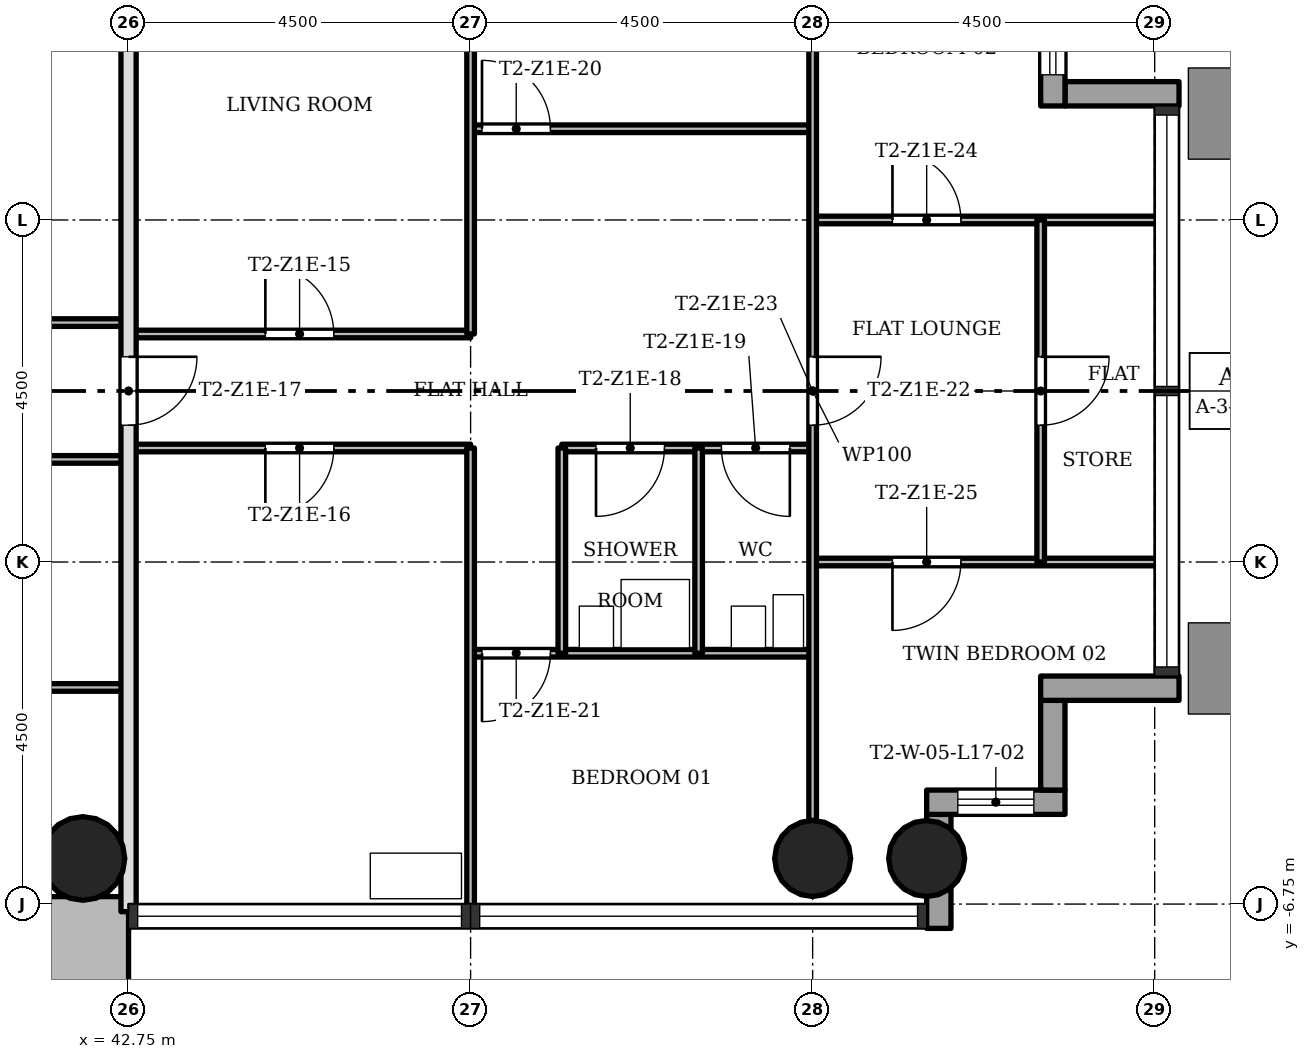
"""IFC4 building model, lengths in metres.
Left out: names, types, materials, properties, quantities, classifications, styles, units other than length and angle.
Written with IfcOpenShell. Run it as: python <this file> out.ifc"""

import sys

from ifc_helpers import new_model, si_unit, direction, frame, frame_2d, origin, origin_2d, place, context, subcontext, project, spatial, rectangle, hollow_circle, extrude, element, fill, save


model = new_model("IFC4")
c1 = context("Model", 3, precision=1e-05, world=origin(), true_north=direction((0.0, 1.0)))
c2 = subcontext(c1, "Body", "Model", "MODEL_VIEW")
j1 = project(units=[si_unit("LENGTHUNIT", "METRE"), si_unit("PLANEANGLEUNIT", "RADIAN")], contexts=[c1])
p1 = place(None, origin())
s1 = spatial("IfcSite", under=j1, at=p1, CompositionType="ELEMENT")
p2 = place(p1, origin())
s2 = spatial("IfcBuilding", under=s1, at=p2, CompositionType="ELEMENT")
p3 = place(p2, frame((0.0, 0.0, 65.3)))
s3 = spatial("IfcBuildingStorey", under=s2, at=p3, CompositionType="ELEMENT", Elevation=65.3)
p4 = place(p3, frame((42.2, -15.248, 0.0), z_axis=(0.0, 0.0, 1.0), x_axis=(0.0, 1.0, 0.0)))
e1 = element("IfcWall", 1, at=p4, inside=s3, PredefinedType="SHEAR", context=c2, shape_type="SweptSolid", body=[
    extrude(rectangle(XDim=8.596, YDim=1.1, at=frame_2d((4.298, 0.0))), origin(), (0.0, 0.0, 1.0), 3.4),
])
for number, where, z_axis, x_axis in (
    (2, (51.75, -6.15, 0.0), (0.0, 0.0, 1.0), (1.0, 0.0, 0.0)),
    (3, (53.25, -6.15, 0.0), (0.0, 0.0, 1.0), (1.0, 0.0, 0.0)),
):
    element("IfcColumn", number, at=place(p3, frame(where, z_axis=z_axis, x_axis=x_axis)), inside=s3, PredefinedType="COLUMN", context=c2, shape_type="SweptSolid", body=[
        extrude(hollow_circle(Radius=0.5, WallThickness=0.036, at=origin_2d()), origin(), (0.0, 0.0, 1.0), 3.4),
    ])
p5 = place(p3, frame((42.15, -6.15, 0.0), z_axis=(0.0, 0.0, 1.0), x_axis=(1.0, 0.0, 0.0)))
e4 = element("IfcColumn", 4, at=p5, inside=s3, PredefinedType="COLUMN", context=c2, shape_type="SweptSolid", body=[
    extrude(hollow_circle(Radius=0.55, WallThickness=0.04, at=origin_2d()), origin(), (0.0, 0.0, 1.0), 3.4),
])
p6 = place(p3, frame((53.41, -7.07, -0.3), z_axis=(0.0, 0.0, 1.0), x_axis=(0.0, 1.0, 0.0)))
e5 = element("IfcWall", 5, at=p6, inside=s3, PredefinedType="STANDARD", context=c2, shape_type="SweptSolid", body=[
    extrude(rectangle(XDim=1.5, YDim=0.32, at=frame_2d((0.75, 0.0))), origin(), (0.0, 0.0, 1.0), 3.4),
])
p7 = place(p3, frame((53.25, -5.41, -0.3), z_axis=(0.0, 0.0, 1.0), x_axis=(1.0, 0.0, 0.0)))
e6 = element("IfcWall", 6, at=p7, inside=s3, PredefinedType="STANDARD", context=c2, shape_type="SweptSolid", body=[
    extrude(rectangle(XDim=1.82, YDim=0.32, at=frame_2d((0.91, 0.0))), origin(), (0.0, 0.0, 1.0), 3.4),
])
p8 = place(p7, frame((0.41, 0.0, 1.2)))
e7 = element("IfcOpeningElement", 7, at=p8, cuts=e6, PredefinedType="OPENING", context=c2, shape_type="SweptSolid", body=[
    extrude(rectangle(XDim=1.0, YDim=1.5, at=frame_2d((0.5, 0.75))), frame((0.0, 0.17, 0.0), z_axis=(0.0, -1.0, 0.0), x_axis=(1.0, 0.0, 0.0)), (0.0, 0.0, 1.0), 0.34),
])
p9 = place(p3, frame((54.91, -5.25, -0.3), z_axis=(0.0, 0.0, 1.0), x_axis=(0.0, 1.0, 0.0)))
e8 = element("IfcWall", 8, at=p9, inside=s3, PredefinedType="STANDARD", context=c2, shape_type="SweptSolid", body=[
    extrude(rectangle(XDim=1.18, YDim=0.32, at=frame_2d((0.59, 0.0))), origin(), (0.0, 0.0, 1.0), 3.4),
])
p10 = place(p3, frame((54.75, -3.91, -0.3), z_axis=(0.0, 0.0, 1.0), x_axis=(1.0, 0.0, 0.0)))
e9 = element("IfcWall", 9, at=p10, inside=s3, PredefinedType="STANDARD", context=c2, shape_type="SweptSolid", body=[
    extrude(rectangle(XDim=1.82, YDim=0.32, at=frame_2d((0.91, 0.0))), origin(), (0.0, 0.0, 1.0), 3.4),
])
p11 = place(p3, frame((56.57, 3.91, -0.3), z_axis=(0.0, 0.0, 1.0), x_axis=(-1.0, 0.0, 0.0)))
e10 = element("IfcWall", 10, at=p11, inside=s3, PredefinedType="STANDARD", context=c2, shape_type="SweptSolid", body=[
    extrude(rectangle(XDim=1.5, YDim=0.32, at=frame_2d((0.75, 0.0))), origin(), (0.0, 0.0, 1.0), 3.4),
])
p12 = place(p3, frame((54.91, 3.75, -0.3), z_axis=(0.0, 0.0, 1.0), x_axis=(0.0, 1.0, 0.0)))
e11 = element("IfcWall", 11, at=p12, inside=s3, PredefinedType="STANDARD", context=c2, shape_type="SweptSolid", body=[
    extrude(rectangle(XDim=1.82, YDim=0.32, at=frame_2d((0.91, 0.0))), origin(), (0.0, 0.0, 1.0), 3.4),
])
p13 = place(p12, frame((0.41, 0.0, 1.2)))
e12 = element("IfcOpeningElement", 12, at=p13, cuts=e11, PredefinedType="OPENING", context=c2, shape_type="SweptSolid", body=[
    extrude(rectangle(XDim=1.0, YDim=1.5, at=frame_2d((0.5, 0.75))), frame((0.0, 0.17, 0.0), z_axis=(0.0, -1.0, 0.0), x_axis=(1.0, 0.0, 0.0)), (0.0, 0.0, 1.0), 0.34),
])
p14 = place(p3, frame((42.75, -3.9, 0.0), z_axis=(0.0, 0.0, 1.0), x_axis=(-1.0, 0.0, 0.0)))
e13 = element("IfcWall", 13, at=p14, inside=s3, PredefinedType="PARTITIONING", context=c2, shape_type="SweptSolid", body=[
    extrude(rectangle(XDim=5.25, YDim=0.1, at=frame_2d((2.625, 0.0))), origin(), (0.0, 0.0, 1.0), 3.0),
])
p15 = place(p3, frame((51.75, -3.45, 0.0), z_axis=(0.0, 0.0, 1.0), x_axis=(-1.0, 0.0, 0.0)))
e14 = element("IfcWall", 14, at=p15, inside=s3, PredefinedType="PARTITIONING", context=c2, shape_type="SweptSolid", body=[
    extrude(rectangle(XDim=4.5, YDim=0.1, at=frame_2d((2.25, 0.0))), origin(), (0.0, 0.0, 1.0), 3.0),
])
p16 = place(p15, frame((3.45, 0.0, 0.0)))
e15 = element("IfcOpeningElement", 15, at=p16, cuts=e14, PredefinedType="OPENING", context=c2, shape_type="SweptSolid", body=[
    extrude(rectangle(XDim=0.9, YDim=2.1, at=frame_2d((0.45, 1.05))), frame((0.0, 0.06, 0.0), z_axis=(0.0, -1.0, 0.0), x_axis=(1.0, 0.0, 0.0)), (0.0, 0.0, 1.0), 0.12),
])
p17 = place(p3, frame((56.35, -2.25, 0.0), z_axis=(0.0, 0.0, 1.0), x_axis=(-1.0, 0.0, 0.0)))
e16 = element("IfcWall", 16, at=p17, inside=s3, PredefinedType="PARTITIONING", context=c2, shape_type="SweptSolid", body=[
    extrude(rectangle(XDim=4.6, YDim=0.1, at=frame_2d((2.3, 0.0))), origin(), (0.0, 0.0, 1.0), 3.0),
])
p18 = place(p17, frame((2.65, 0.0, 0.0)))
e17 = element("IfcOpeningElement", 17, at=p18, cuts=e16, PredefinedType="OPENING", context=c2, shape_type="SweptSolid", body=[
    extrude(rectangle(XDim=0.9, YDim=2.1, at=frame_2d((0.45, 1.05))), frame((0.0, 0.06, 0.0), z_axis=(0.0, -1.0, 0.0), x_axis=(1.0, 0.0, 0.0)), (0.0, 0.0, 1.0), 0.12),
])
p19 = place(p3, frame((42.75, -0.9, 0.0), z_axis=(0.0, 0.0, 1.0), x_axis=(-1.0, 0.0, 0.0)))
e18 = element("IfcWall", 18, at=p19, inside=s3, PredefinedType="PARTITIONING", context=c2, shape_type="SweptSolid", body=[
    extrude(rectangle(XDim=5.25, YDim=0.1, at=frame_2d((2.625, 0.0))), origin(), (0.0, 0.0, 1.0), 3.0),
])
p20 = place(p19, frame((2.175, 0.0, 0.0)))
e19 = element("IfcOpeningElement", 19, at=p20, cuts=e18, PredefinedType="OPENING", context=c2, shape_type="SweptSolid", body=[
    extrude(rectangle(XDim=0.9, YDim=2.1, at=frame_2d((0.45, 1.05))), frame((0.0, 0.06, 0.0), z_axis=(0.0, -1.0, 0.0), x_axis=(1.0, 0.0, 0.0)), (0.0, 0.0, 1.0), 0.12),
])
p21 = place(p3, frame((51.75, -0.75, 0.0), z_axis=(0.0, 0.0, 1.0), x_axis=(-1.0, 0.0, 0.0)))
e20 = element("IfcWall", 20, at=p21, inside=s3, PredefinedType="PARTITIONING", context=c2, shape_type="SweptSolid", body=[
    extrude(rectangle(XDim=3.3, YDim=0.1, at=frame_2d((1.65, 0.0))), origin(), (0.0, 0.0, 1.0), 3.0),
])
p22 = place(p21, frame((1.95, 0.0, 0.0)))
e21 = element("IfcOpeningElement", 21, at=p22, cuts=e20, PredefinedType="OPENING", context=c2, shape_type="SweptSolid", body=[
    extrude(rectangle(XDim=0.9, YDim=2.1, at=frame_2d((0.45, 1.05))), frame((0.0, 0.06, 0.0), z_axis=(0.0, -1.0, 0.0), x_axis=(1.0, 0.0, 0.0)), (0.0, 0.0, 1.0), 0.12),
])
p23 = place(p21, frame((0.3, 0.0, 0.0)))
e22 = element("IfcOpeningElement", 22, at=p23, cuts=e20, PredefinedType="OPENING", context=c2, shape_type="SweptSolid", body=[
    extrude(rectangle(XDim=0.9, YDim=2.1, at=frame_2d((0.45, 1.05))), frame((0.0, 0.06, 0.0), z_axis=(0.0, -1.0, 0.0), x_axis=(1.0, 0.0, 0.0)), (0.0, 0.0, 1.0), 0.12),
])
p24 = place(p3, frame((47.25, -0.75, 0.0), z_axis=(0.0, 0.0, 1.0), x_axis=(-1.0, 0.0, 0.0)))
e23 = element("IfcWall", 23, at=p24, inside=s3, PredefinedType="PARTITIONING", context=c2, shape_type="SweptSolid", body=[
    extrude(rectangle(XDim=4.5, YDim=0.1, at=frame_2d((2.25, 0.0))), origin(), (0.0, 0.0, 1.0), 3.0),
])
p25 = place(p24, frame((1.8, 0.0, 0.0)))
e24 = element("IfcOpeningElement", 24, at=p25, cuts=e23, PredefinedType="OPENING", context=c2, shape_type="SweptSolid", body=[
    extrude(rectangle(XDim=0.9, YDim=2.1, at=frame_2d((0.45, 1.05))), frame((0.0, 0.06, 0.0), z_axis=(0.0, -1.0, 0.0), x_axis=(1.0, 0.0, 0.0)), (0.0, 0.0, 1.0), 0.12),
])
p26 = place(p3, frame((47.25, 0.75, 0.0), z_axis=(0.0, 0.0, 1.0), x_axis=(-1.0, 0.0, 0.0)))
e25 = element("IfcWall", 25, at=p26, inside=s3, PredefinedType="PARTITIONING", context=c2, shape_type="SweptSolid", body=[
    extrude(rectangle(XDim=4.5, YDim=0.1, at=frame_2d((2.25, 0.0))), origin(), (0.0, 0.0, 1.0), 3.0),
])
p27 = place(p26, frame((1.8, 0.0, 0.0)))
e26 = element("IfcOpeningElement", 26, at=p27, cuts=e25, PredefinedType="OPENING", context=c2, shape_type="SweptSolid", body=[
    extrude(rectangle(XDim=0.9, YDim=2.1, at=frame_2d((0.45, 1.05))), frame((0.0, 0.06, 0.0), z_axis=(0.0, -1.0, 0.0), x_axis=(1.0, 0.0, 0.0)), (0.0, 0.0, 1.0), 0.12),
])
p28 = place(p3, frame((42.75, 0.9, 0.0), z_axis=(0.0, 0.0, 1.0), x_axis=(-1.0, 0.0, 0.0)))
e27 = element("IfcWall", 27, at=p28, inside=s3, PredefinedType="PARTITIONING", context=c2, shape_type="SweptSolid", body=[
    extrude(rectangle(XDim=5.25, YDim=0.1, at=frame_2d((2.625, 0.0))), origin(), (0.0, 0.0, 1.0), 3.0),
])
p29 = place(p3, frame((56.35, 2.25, 0.0), z_axis=(0.0, 0.0, 1.0), x_axis=(-1.0, 0.0, 0.0)))
e28 = element("IfcWall", 28, at=p29, inside=s3, PredefinedType="PARTITIONING", context=c2, shape_type="SweptSolid", body=[
    extrude(rectangle(XDim=4.6, YDim=0.1, at=frame_2d((2.3, 0.0))), origin(), (0.0, 0.0, 1.0), 3.0),
])
p30 = place(p29, frame((2.65, 0.0, 0.0)))
e29 = element("IfcOpeningElement", 29, at=p30, cuts=e28, PredefinedType="OPENING", context=c2, shape_type="SweptSolid", body=[
    extrude(rectangle(XDim=0.9, YDim=2.1, at=frame_2d((0.45, 1.05))), frame((0.0, 0.06, 0.0), z_axis=(0.0, -1.0, 0.0), x_axis=(1.0, 0.0, 0.0)), (0.0, 0.0, 1.0), 0.12),
])
p31 = place(p3, frame((51.75, 3.45, 0.0), z_axis=(0.0, 0.0, 1.0), x_axis=(-1.0, 0.0, 0.0)))
e30 = element("IfcWall", 30, at=p31, inside=s3, PredefinedType="PARTITIONING", context=c2, shape_type="SweptSolid", body=[
    extrude(rectangle(XDim=4.5, YDim=0.1, at=frame_2d((2.25, 0.0))), origin(), (0.0, 0.0, 1.0), 3.0),
])
p32 = place(p31, frame((3.45, 0.0, 0.0)))
e31 = element("IfcOpeningElement", 31, at=p32, cuts=e30, PredefinedType="OPENING", context=c2, shape_type="SweptSolid", body=[
    extrude(rectangle(XDim=0.9, YDim=2.1, at=frame_2d((0.45, 1.05))), frame((0.0, 0.06, 0.0), z_axis=(0.0, -1.0, 0.0), x_axis=(1.0, 0.0, 0.0)), (0.0, 0.0, 1.0), 0.12),
])
p33 = place(p3, frame((54.75, -2.25, 0.0), z_axis=(0.0, 0.0, 1.0), x_axis=(0.0, 1.0, 0.0)))
e32 = element("IfcWall", 32, at=p33, inside=s3, PredefinedType="PARTITIONING", context=c2, shape_type="SweptSolid", body=[
    extrude(rectangle(XDim=4.5, YDim=0.1, at=frame_2d((2.25, 0.0))), origin(), (0.0, 0.0, 1.0), 3.0),
])
p34 = place(p33, frame((1.8, 0.0, 0.0)))
e33 = element("IfcOpeningElement", 33, at=p34, cuts=e32, PredefinedType="OPENING", context=c2, shape_type="SweptSolid", body=[
    extrude(rectangle(XDim=0.9, YDim=2.1, at=frame_2d((0.45, 1.05))), frame((0.0, 0.06, 0.0), z_axis=(0.0, -1.0, 0.0), x_axis=(1.0, 0.0, 0.0)), (0.0, 0.0, 1.0), 0.12),
])
p35 = place(p3, frame((51.75, -5.65, 0.0), z_axis=(0.0, 0.0, 1.0), x_axis=(0.0, 1.0, 0.0)))
e34 = element("IfcWall", 34, at=p35, inside=s3, PredefinedType="PARTITIONING", context=c2, shape_type="SweptSolid", body=[
    extrude(rectangle(XDim=11.3, YDim=0.1, at=frame_2d((5.65, 0.0))), origin(), (0.0, 0.0, 1.0), 3.0),
])
p36 = place(p35, frame((5.2, 0.0, 0.0)))
e35 = element("IfcOpeningElement", 35, at=p36, cuts=e34, PredefinedType="OPENING", context=c2, shape_type="SweptSolid", body=[
    extrude(rectangle(XDim=0.9, YDim=2.1, at=frame_2d((0.45, 1.05))), frame((0.0, 0.06, 0.0), z_axis=(0.0, -1.0, 0.0), x_axis=(1.0, 0.0, 0.0)), (0.0, 0.0, 1.0), 0.12),
])
for number, where, z_axis, x_axis in (
    (36, (50.25, -3.45, 0.0), (0.0, 0.0, 1.0), (0.0, 1.0, 0.0)),
    (37, (48.45, -3.45, 0.0), (0.0, 0.0, 1.0), (0.0, 1.0, 0.0)),
):
    element("IfcWall", number, at=place(p3, frame(where, z_axis=z_axis, x_axis=x_axis)), inside=s3, PredefinedType="PARTITIONING", context=c2, shape_type="SweptSolid", body=[
        extrude(rectangle(XDim=2.7, YDim=0.1, at=frame_2d((1.35, 0.0))), origin(), (0.0, 0.0, 1.0), 3.0),
    ])
for number, where, z_axis, x_axis in (
    (38, (47.25, -6.85, 0.0), (0.0, 0.0, 1.0), (0.0, 1.0, 0.0)),
    (39, (47.25, 0.75, 0.0), (0.0, 0.0, 1.0), (0.0, 1.0, 0.0)),
):
    element("IfcWall", number, at=place(p3, frame(where, z_axis=z_axis, x_axis=x_axis)), inside=s3, PredefinedType="PARTITIONING", context=c2, shape_type="SweptSolid", body=[
        extrude(rectangle(XDim=6.1, YDim=0.1, at=frame_2d((3.05, 0.0))), origin(), (0.0, 0.0, 1.0), 3.0),
    ])
p37 = place(p3, frame((42.75, -6.85, 0.0), z_axis=(0.0, 0.0, 1.0), x_axis=(0.0, 1.0, 0.0)))
e40 = element("IfcWall", 40, at=p37, inside=s3, PredefinedType="SOLIDWALL", context=c2, shape_type="SweptSolid", body=[
    extrude(rectangle(XDim=13.7, YDim=0.2, at=frame_2d((6.85, 0.0))), origin(), (0.0, 0.0, 1.0), 3.0),
])
p38 = place(p37, frame((6.4, 0.0, 0.0)))
e41 = element("IfcOpeningElement", 41, at=p38, cuts=e40, PredefinedType="OPENING", context=c2, shape_type="SweptSolid", body=[
    extrude(rectangle(XDim=0.9, YDim=2.1, at=frame_2d((0.45, 1.05))), frame((0.0, 0.11, 0.0), z_axis=(0.0, -1.0, 0.0), x_axis=(1.0, 0.0, 0.0)), (0.0, 0.0, 1.0), 0.22),
])
p39 = place(p27, origin())
e42 = element("IfcDoor", 42, at=p39, inside=s3, OperationType="SINGLE_SWING_RIGHT", PredefinedType="DOOR", context=c2, shape_type="SweptSolid", body=[
    extrude(rectangle(XDim=0.9, YDim=2.1, at=frame_2d((0.45, 1.05))), frame((0.0, 0.025, 0.0), z_axis=(0.0, -1.0, 0.0), x_axis=(1.0, 0.0, 0.0)), (0.0, 0.0, 1.0), 0.05),
])
fill(e26, e42)
p40 = place(p25, origin())
e43 = element("IfcDoor", 43, at=p40, inside=s3, OperationType="SINGLE_SWING_LEFT", PredefinedType="DOOR", context=c2, shape_type="SweptSolid", body=[
    extrude(rectangle(XDim=0.9, YDim=2.1, at=frame_2d((0.45, 1.05))), frame((0.0, 0.025, 0.0), z_axis=(0.0, -1.0, 0.0), x_axis=(1.0, 0.0, 0.0)), (0.0, 0.0, 1.0), 0.05),
])
fill(e24, e43)
p41 = place(p38, origin())
e44 = element("IfcDoor", 44, at=p41, inside=s3, OperationType="SINGLE_SWING_RIGHT", PredefinedType="DOOR", context=c2, shape_type="SweptSolid", body=[
    extrude(rectangle(XDim=0.9, YDim=2.1, at=frame_2d((0.45, 1.05))), frame((0.0, 0.025, 0.0), z_axis=(0.0, -1.0, 0.0), x_axis=(1.0, 0.0, 0.0)), (0.0, 0.0, 1.0), 0.05),
])
fill(e41, e44)
p42 = place(p22, origin())
e45 = element("IfcDoor", 45, at=p42, inside=s3, OperationType="SINGLE_SWING_LEFT", PredefinedType="DOOR", context=c2, shape_type="SweptSolid", body=[
    extrude(rectangle(XDim=0.9, YDim=2.1, at=frame_2d((0.45, 1.05))), frame((0.0, 0.025, 0.0), z_axis=(0.0, -1.0, 0.0), x_axis=(1.0, 0.0, 0.0)), (0.0, 0.0, 1.0), 0.05),
])
fill(e21, e45)
p43 = place(p23, origin())
e46 = element("IfcDoor", 46, at=p43, inside=s3, OperationType="SINGLE_SWING_RIGHT", PredefinedType="DOOR", context=c2, shape_type="SweptSolid", body=[
    extrude(rectangle(XDim=0.9, YDim=2.1, at=frame_2d((0.45, 1.05))), frame((0.0, 0.025, 0.0), z_axis=(0.0, -1.0, 0.0), x_axis=(1.0, 0.0, 0.0)), (0.0, 0.0, 1.0), 0.05),
])
fill(e22, e46)
p44 = place(p32, origin())
e47 = element("IfcDoor", 47, at=p44, inside=s3, OperationType="SINGLE_SWING_RIGHT", PredefinedType="DOOR", context=c2, shape_type="SweptSolid", body=[
    extrude(rectangle(XDim=0.9, YDim=2.1, at=frame_2d((0.45, 1.05))), frame((0.0, 0.025, 0.0), z_axis=(0.0, -1.0, 0.0), x_axis=(1.0, 0.0, 0.0)), (0.0, 0.0, 1.0), 0.05),
])
fill(e31, e47)
p45 = place(p16, origin())
e48 = element("IfcDoor", 48, at=p45, inside=s3, OperationType="SINGLE_SWING_LEFT", PredefinedType="DOOR", context=c2, shape_type="SweptSolid", body=[
    extrude(rectangle(XDim=0.9, YDim=2.1, at=frame_2d((0.45, 1.05))), frame((0.0, 0.025, 0.0), z_axis=(0.0, -1.0, 0.0), x_axis=(1.0, 0.0, 0.0)), (0.0, 0.0, 1.0), 0.05),
])
fill(e15, e48)
p46 = place(p34, origin())
e49 = element("IfcDoor", 49, at=p46, inside=s3, OperationType="SINGLE_SWING_RIGHT", PredefinedType="DOOR", context=c2, shape_type="SweptSolid", body=[
    extrude(rectangle(XDim=0.9, YDim=2.1, at=frame_2d((0.45, 1.05))), frame((0.0, 0.025, 0.0), z_axis=(0.0, -1.0, 0.0), x_axis=(1.0, 0.0, 0.0)), (0.0, 0.0, 1.0), 0.05),
])
fill(e33, e49)
p47 = place(p36, origin())
e50 = element("IfcDoor", 50, at=p47, inside=s3, OperationType="SINGLE_SWING_RIGHT", PredefinedType="DOOR", context=c2, shape_type="SweptSolid", body=[
    extrude(rectangle(XDim=0.9, YDim=2.1, at=frame_2d((0.45, 1.05))), frame((0.0, 0.025, 0.0), z_axis=(0.0, -1.0, 0.0), x_axis=(1.0, 0.0, 0.0)), (0.0, 0.0, 1.0), 0.05),
])
fill(e35, e50)
p48 = place(p30, origin())
e51 = element("IfcDoor", 51, at=p48, inside=s3, OperationType="SINGLE_SWING_RIGHT", PredefinedType="DOOR", context=c2, shape_type="SweptSolid", body=[
    extrude(rectangle(XDim=0.9, YDim=2.1, at=frame_2d((0.45, 1.05))), frame((0.0, 0.025, 0.0), z_axis=(0.0, -1.0, 0.0), x_axis=(1.0, 0.0, 0.0)), (0.0, 0.0, 1.0), 0.05),
])
fill(e29, e51)
p49 = place(p18, origin())
e52 = element("IfcDoor", 52, at=p49, inside=s3, OperationType="SINGLE_SWING_LEFT", PredefinedType="DOOR", context=c2, shape_type="SweptSolid", body=[
    extrude(rectangle(XDim=0.9, YDim=2.1, at=frame_2d((0.45, 1.05))), frame((0.0, 0.025, 0.0), z_axis=(0.0, -1.0, 0.0), x_axis=(1.0, 0.0, 0.0)), (0.0, 0.0, 1.0), 0.05),
])
fill(e17, e52)
p50 = place(p13, origin())
e53 = element("IfcWindow", 53, at=p50, inside=s3, PartitioningType="SINGLE_PANEL", PredefinedType="WINDOW", context=c2, shape_type="SweptSolid", body=[
    extrude(rectangle(XDim=1.0, YDim=1.5, at=frame_2d((0.5, 0.75))), frame((0.0, 0.03, 0.0), z_axis=(0.0, -1.0, 0.0), x_axis=(1.0, 0.0, 0.0)), (0.0, 0.0, 1.0), 0.06),
])
fill(e12, e53)
p51 = place(p8, origin())
e54 = element("IfcWindow", 54, at=p51, inside=s3, PartitioningType="SINGLE_PANEL", PredefinedType="WINDOW", context=c2, shape_type="SweptSolid", body=[
    extrude(rectangle(XDim=1.0, YDim=1.5, at=frame_2d((0.5, 0.75))), frame((0.0, 0.03, 0.0), z_axis=(0.0, -1.0, 0.0), x_axis=(1.0, 0.0, 0.0)), (0.0, 0.0, 1.0), 0.06),
])
fill(e7, e54)
save(model, sys.argv[1])
